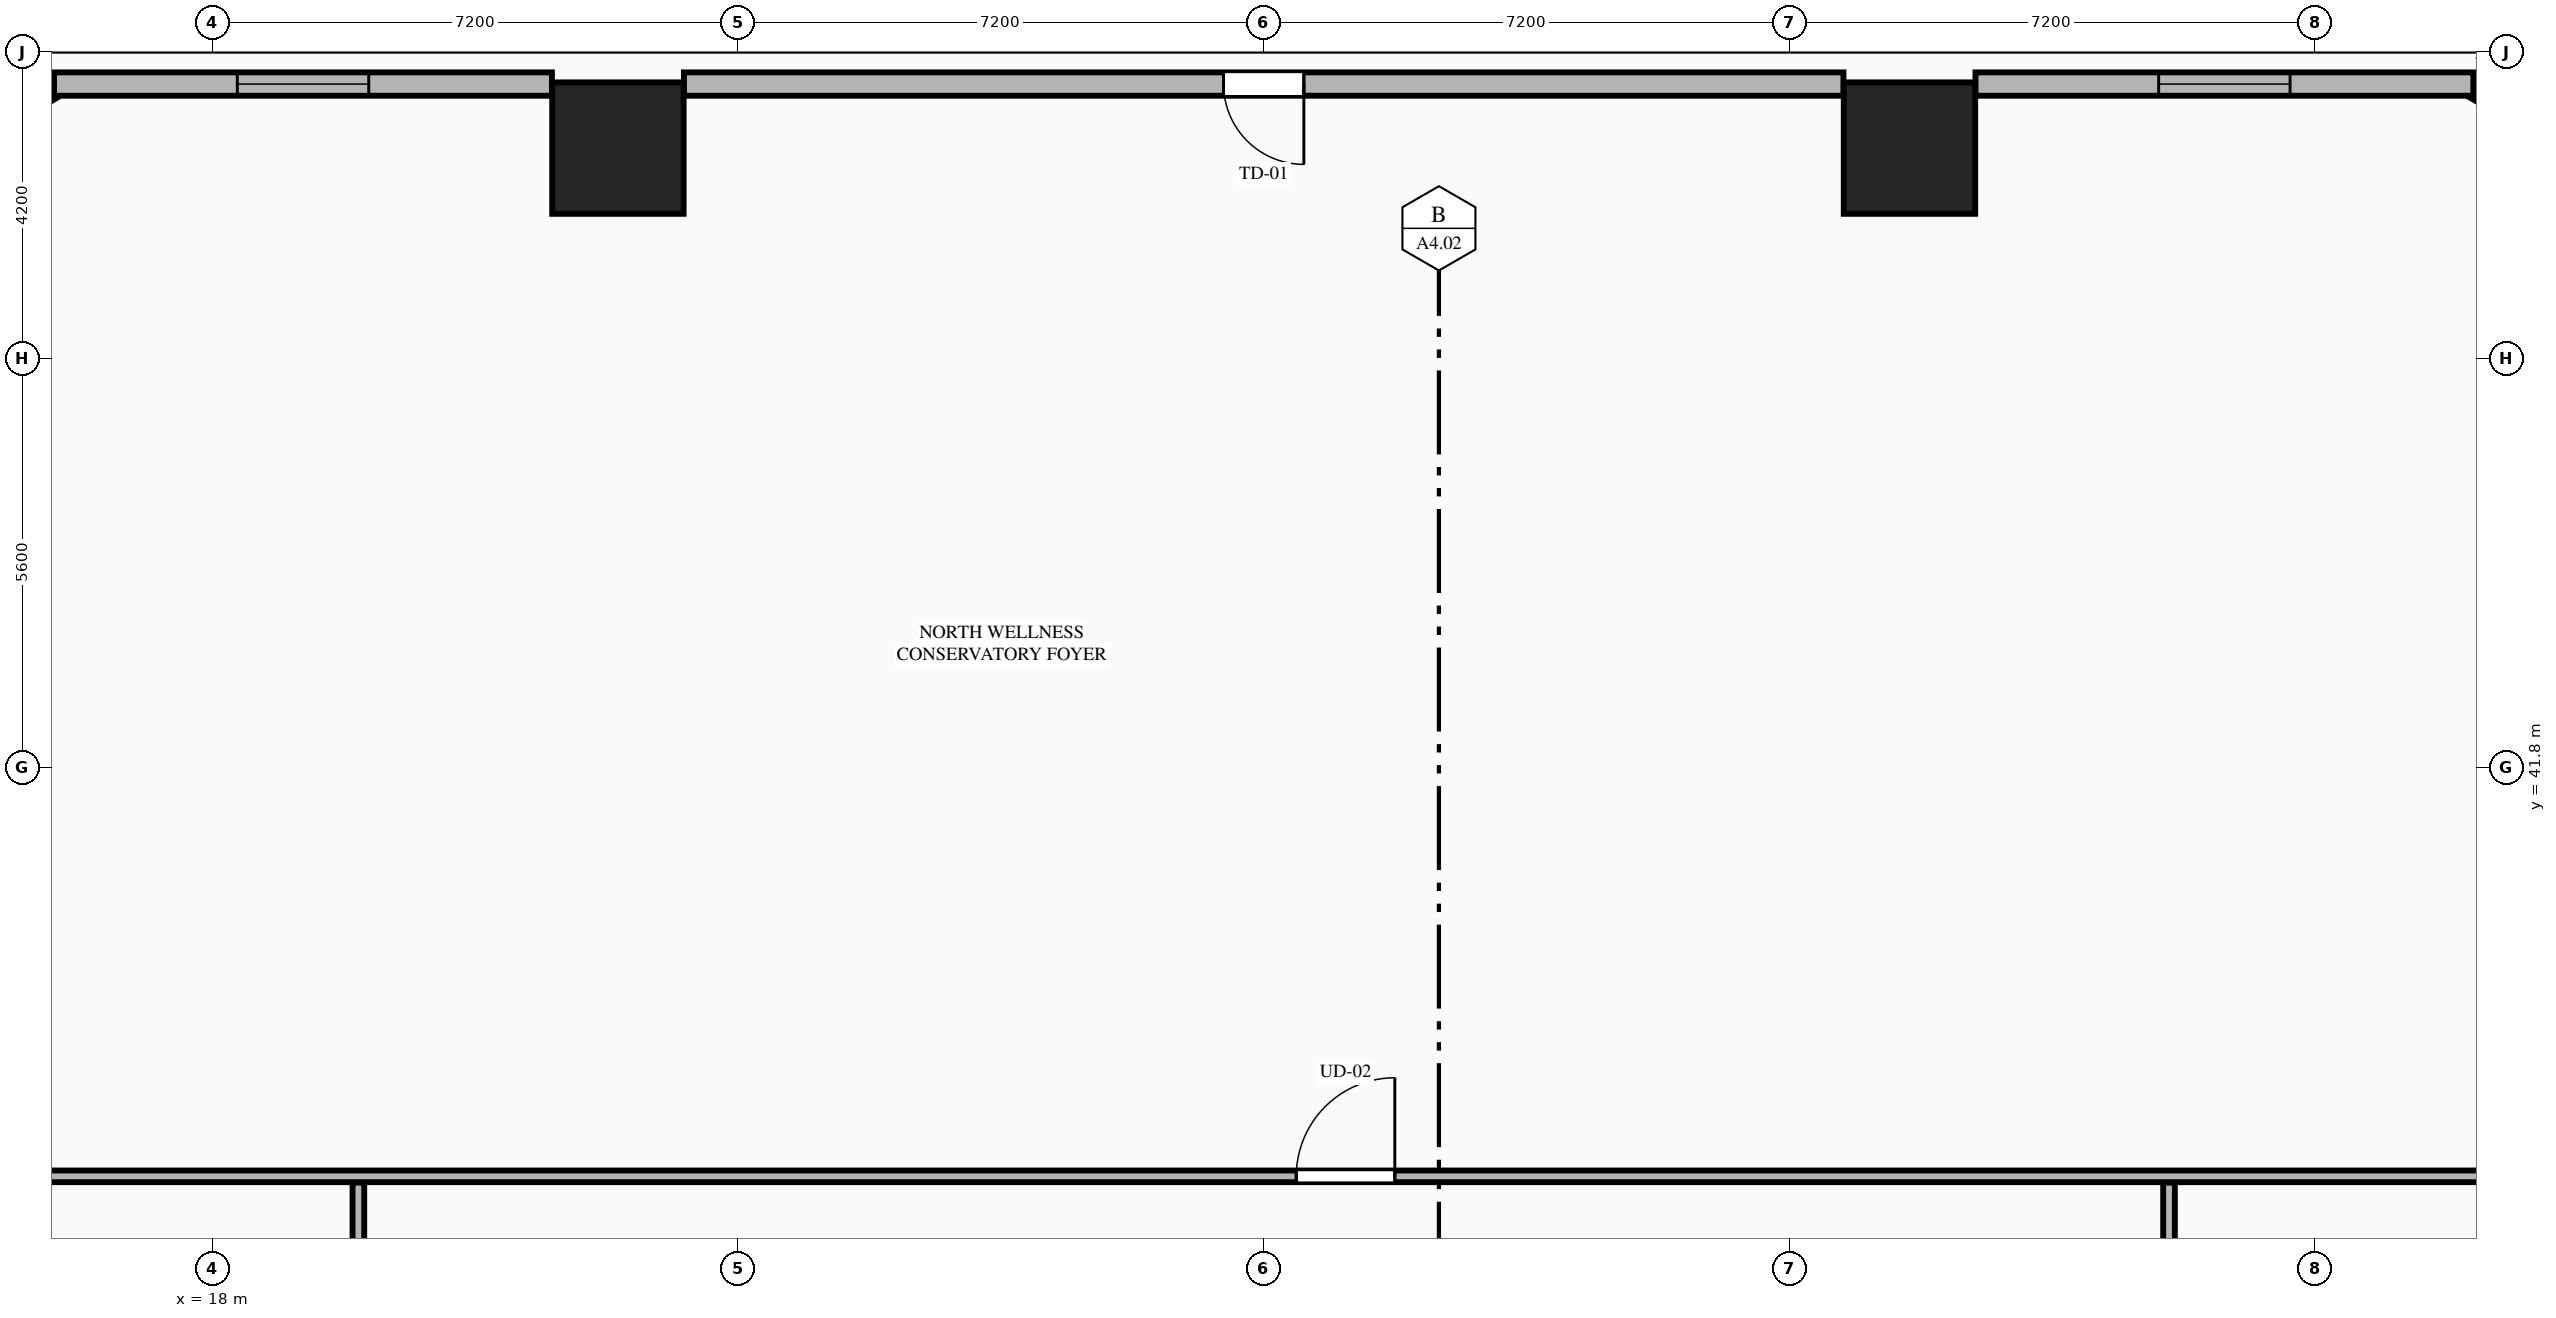
"""IFC4 building model, lengths in metres.
Left out: names, types, materials, properties, quantities, classifications, styles, units other than length and angle.
Written with IfcOpenShell. Run it as: python <this file> out.ifc"""

import sys

from ifc_helpers import new_model, si_unit, direction, frame, frame_2d, origin, origin_2d, place, context, subcontext, project, spatial, rectangle, extrude, element, fill, save


model = new_model("IFC4")
c1 = context("Model", 3, precision=1e-05, world=origin(), true_north=direction((0.0, 1.0)))
c2 = subcontext(c1, "Body", "Model", "MODEL_VIEW")
j1 = project(units=[si_unit("LENGTHUNIT", "METRE"), si_unit("PLANEANGLEUNIT", "RADIAN")], contexts=[c1])
p1 = place(None, origin())
s1 = spatial("IfcSite", under=j1, at=p1, CompositionType="ELEMENT")
p2 = place(p1, origin())
s2 = spatial("IfcBuilding", under=s1, at=p2, CompositionType="ELEMENT")
p3 = place(p2, frame((0.0, 0.0, 15.0)))
s3 = spatial("IfcBuildingStorey", under=s2, at=p3, CompositionType="ELEMENT", Elevation=15.0)
for number, where, z_axis, x_axis in (
    (1, (41.245, 50.283, 0.0), (0.0, 0.0, 1.0), (1.0, 0.0, 0.0)),
    (2, (23.555, 50.283, 0.0), (0.0, 0.0, 1.0), (1.0, 0.0, 0.0)),
):
    element("IfcColumn", number, at=place(p3, frame(where, z_axis=z_axis, x_axis=x_axis)), inside=s3, PredefinedType="COLUMN", context=c2, shape_type="SweptSolid", body=[
        extrude(rectangle(XDim=1.8, YDim=1.8, at=origin_2d()), origin(), (0.0, 0.0, 1.0), 4.5),
    ])
p4 = place(p3, frame((20.0, 17.8, 0.0), z_axis=(0.0, 0.0, 1.0), x_axis=(0.0, 1.0, 0.0)))
e3 = element("IfcWall", 3, at=p4, inside=s3, PredefinedType="PARTITIONING", context=c2, shape_type="SweptSolid", body=[
    extrude(rectangle(XDim=18.315, YDim=0.16, at=frame_2d((9.157, 0.0))), origin(), (0.0, 0.0, 1.0), 4.22),
])
p5 = place(p4, frame((3.8, 0.0, 0.0)))
e4 = element("IfcOpeningElement", 4, at=p5, cuts=e3, PredefinedType="OPENING", context=c2, shape_type="SweptSolid", body=[
    extrude(rectangle(XDim=1.35, YDim=2.35, at=frame_2d((0.675, 1.175))), frame((0.0, 0.09, 0.0), z_axis=(0.0, -1.0, 0.0), x_axis=(1.0, 0.0, 0.0)), (0.0, 0.0, 1.0), 0.18),
])
p6 = place(p4, frame((13.0, 0.0, 0.0)))
e5 = element("IfcOpeningElement", 5, at=p6, cuts=e3, PredefinedType="OPENING", context=c2, shape_type="SweptSolid", body=[
    extrude(rectangle(XDim=1.02, YDim=2.25, at=frame_2d((0.51, 1.125))), frame((0.0, 0.09, 0.0), z_axis=(0.0, -1.0, 0.0), x_axis=(1.0, 0.0, 0.0)), (0.0, 0.0, 1.0), 0.18),
])
p7 = place(p3, frame((44.8, 17.8, 0.0), z_axis=(0.0, 0.0, 1.0), x_axis=(0.0, 1.0, 0.0)))
e6 = element("IfcWall", 6, at=p7, inside=s3, PredefinedType="PARTITIONING", context=c2, shape_type="SweptSolid", body=[
    extrude(rectangle(XDim=18.315, YDim=0.16, at=frame_2d((9.157, 0.0))), origin(), (0.0, 0.0, 1.0), 4.22),
])
p8 = place(p7, frame((3.8, 0.0, 0.0)))
e7 = element("IfcOpeningElement", 7, at=p8, cuts=e6, PredefinedType="OPENING", context=c2, shape_type="SweptSolid", body=[
    extrude(rectangle(XDim=1.35, YDim=2.35, at=frame_2d((0.675, 1.175))), frame((0.0, 0.09, 0.0), z_axis=(0.0, -1.0, 0.0), x_axis=(1.0, 0.0, 0.0)), (0.0, 0.0, 1.0), 0.18),
])
p9 = place(p7, frame((13.8, 0.0, 0.0)))
e8 = element("IfcOpeningElement", 8, at=p9, cuts=e6, PredefinedType="OPENING", context=c2, shape_type="SweptSolid", body=[
    extrude(rectangle(XDim=0.86, YDim=2.1, at=frame_2d((0.43, 1.05))), frame((0.0, 0.09, 0.0), z_axis=(0.0, -1.0, 0.0), x_axis=(1.0, 0.0, 0.0)), (0.0, 0.0, 1.0), 0.18),
])
p10 = place(p7, frame((16.3, 0.0, 0.0)))
e9 = element("IfcOpeningElement", 9, at=p10, cuts=e6, PredefinedType="OPENING", context=c2, shape_type="SweptSolid", body=[
    extrude(rectangle(XDim=0.96, YDim=2.15, at=frame_2d((0.48, 1.075))), frame((0.0, 0.09, 0.0), z_axis=(0.0, -1.0, 0.0), x_axis=(1.0, 0.0, 0.0)), (0.0, 0.0, 1.0), 0.18),
])
p11 = place(p3, frame((6.346, 36.2, 0.0), z_axis=(0.0, 0.0, 1.0), x_axis=(1.0, 0.0, 0.0)))
e10 = element("IfcWall", 10, at=p11, inside=s3, PredefinedType="PARTITIONING", context=c2, shape_type="SweptSolid", body=[
    extrude(rectangle(XDim=52.108, YDim=0.16, at=frame_2d((26.054, 0.0))), origin(), (0.0, 0.0, 1.0), 4.22),
])
p12 = place(p11, frame((6.5, 0.0, 0.0)))
e11 = element("IfcOpeningElement", 11, at=p12, cuts=e10, PredefinedType="OPENING", context=c2, shape_type="SweptSolid", body=[
    extrude(rectangle(XDim=1.35, YDim=2.35, at=frame_2d((0.675, 1.175))), frame((0.0, 0.09, 0.0), z_axis=(0.0, -1.0, 0.0), x_axis=(1.0, 0.0, 0.0)), (0.0, 0.0, 1.0), 0.18),
])
p13 = place(p11, frame((26.5, 0.0, 0.0)))
e12 = element("IfcOpeningElement", 12, at=p13, cuts=e10, PredefinedType="OPENING", context=c2, shape_type="SweptSolid", body=[
    extrude(rectangle(XDim=1.35, YDim=2.35, at=frame_2d((0.675, 1.175))), frame((0.0, 0.09, 0.0), z_axis=(0.0, -1.0, 0.0), x_axis=(1.0, 0.0, 0.0)), (0.0, 0.0, 1.0), 0.18),
])
p14 = place(p3, frame((50.903, 49.992, 0.0), z_axis=(0.0, 0.0, 1.0), x_axis=(-0.861209017918, 0.508250949293, 0.0)))
e13 = element("IfcWall", 13, at=p14, inside=s3, PredefinedType="STANDARD", context=c2, shape_type="SweptSolid", body=[
    extrude(rectangle(XDim=2.253, YDim=0.32, at=frame_2d((1.126, 0.0))), origin(), (0.0, 0.0, 1.0), 4.22),
])
p15 = place(p3, frame((15.837, 51.137, 0.0), z_axis=(0.0, 0.0, 1.0), x_axis=(-0.861181020205, -0.508298387209, 0.0)))
e14 = element("IfcWall", 14, at=p15, inside=s3, PredefinedType="STANDARD", context=c2, shape_type="SweptSolid", body=[
    extrude(rectangle(XDim=2.253, YDim=0.32, at=frame_2d((1.126, 0.0))), origin(), (0.0, 0.0, 1.0), 4.22),
])
p16 = place(p3, frame((48.968, 51.16, 0.0), z_axis=(0.0, 0.0, 1.0), x_axis=(-1.0, 0.0, 0.0)))
e15 = element("IfcWall", 15, at=p16, inside=s3, PredefinedType="STANDARD", context=c2, shape_type="SweptSolid", body=[
    extrude(rectangle(XDim=6.819, YDim=0.32, at=frame_2d((3.41, 0.0))), origin(), (0.0, 0.0, 1.0), 4.22),
])
p17 = place(p16, frame((2.51, 0.0, 0.75)))
e16 = element("IfcOpeningElement", 16, at=p17, cuts=e15, PredefinedType="OPENING", context=c2, shape_type="SweptSolid", body=[
    extrude(rectangle(XDim=1.8, YDim=2.4, at=frame_2d((0.9, 1.2))), frame((0.0, 0.17, 0.0), z_axis=(0.0, -1.0, 0.0), x_axis=(1.0, 0.0, 0.0)), (0.0, 0.0, 1.0), 0.34),
])
p18 = place(p3, frame((40.341, 51.16, 0.0), z_axis=(0.0, 0.0, 1.0), x_axis=(-1.0, 0.0, 0.0)))
e17 = element("IfcWall", 17, at=p18, inside=s3, PredefinedType="STANDARD", context=c2, shape_type="SweptSolid", body=[
    extrude(rectangle(XDim=15.882, YDim=0.32, at=frame_2d((7.941, 0.0))), origin(), (0.0, 0.0, 1.0), 4.22),
])
p19 = place(p18, frame((7.391, 0.0, 0.0)))
e18 = element("IfcOpeningElement", 18, at=p19, cuts=e17, PredefinedType="OPENING", context=c2, shape_type="SweptSolid", body=[
    extrude(rectangle(XDim=1.1, YDim=2.25, at=frame_2d((0.55, 1.125))), frame((0.0, 0.17, 0.0), z_axis=(0.0, -1.0, 0.0), x_axis=(1.0, 0.0, 0.0)), (0.0, 0.0, 1.0), 0.34),
])
p20 = place(p3, frame((22.651, 51.16, 0.0), z_axis=(0.0, 0.0, 1.0), x_axis=(-1.0, 0.0, 0.0)))
e19 = element("IfcWall", 19, at=p20, inside=s3, PredefinedType="STANDARD", context=c2, shape_type="SweptSolid", body=[
    extrude(rectangle(XDim=6.819, YDim=0.32, at=frame_2d((3.409, 0.0))), origin(), (0.0, 0.0, 1.0), 4.22),
])
p21 = place(p20, frame((2.509, 0.0, 0.75)))
e20 = element("IfcOpeningElement", 20, at=p21, cuts=e19, PredefinedType="OPENING", context=c2, shape_type="SweptSolid", body=[
    extrude(rectangle(XDim=1.8, YDim=2.4, at=frame_2d((0.9, 1.2))), frame((0.0, 0.17, 0.0), z_axis=(0.0, -1.0, 0.0), x_axis=(1.0, 0.0, 0.0)), (0.0, 0.0, 1.0), 0.34),
])
p22 = place(p13, origin())
e21 = element("IfcDoor", 21, at=p22, inside=s3, OperationType="SINGLE_SWING_RIGHT", PredefinedType="DOOR", context=c2, shape_type="SweptSolid", body=[
    extrude(rectangle(XDim=1.35, YDim=2.35, at=frame_2d((0.675, 1.175))), frame((0.0, 0.025, 0.0), z_axis=(0.0, -1.0, 0.0), x_axis=(1.0, 0.0, 0.0)), (0.0, 0.0, 1.0), 0.05),
])
fill(e12, e21)
p23 = place(p17, origin())
e22 = element("IfcWindow", 22, at=p23, inside=s3, PartitioningType="SINGLE_PANEL", PredefinedType="WINDOW", context=c2, shape_type="SweptSolid", body=[
    extrude(rectangle(XDim=1.8, YDim=2.4, at=frame_2d((0.9, 1.2))), frame((0.0, 0.03, 0.0), z_axis=(0.0, -1.0, 0.0), x_axis=(1.0, 0.0, 0.0)), (0.0, 0.0, 1.0), 0.06),
])
fill(e16, e22)
p24 = place(p19, origin())
e23 = element("IfcDoor", 23, at=p24, inside=s3, OperationType="SINGLE_SWING_LEFT", PredefinedType="DOOR", context=c2, shape_type="SweptSolid", body=[
    extrude(rectangle(XDim=1.1, YDim=2.25, at=frame_2d((0.55, 1.125))), frame((0.0, 0.025, 0.0), z_axis=(0.0, -1.0, 0.0), x_axis=(1.0, 0.0, 0.0)), (0.0, 0.0, 1.0), 0.05),
])
fill(e18, e23)
p25 = place(p21, origin())
e24 = element("IfcWindow", 24, at=p25, inside=s3, PartitioningType="SINGLE_PANEL", PredefinedType="WINDOW", context=c2, shape_type="SweptSolid", body=[
    extrude(rectangle(XDim=1.8, YDim=2.4, at=frame_2d((0.9, 1.2))), frame((0.0, 0.03, 0.0), z_axis=(0.0, -1.0, 0.0), x_axis=(1.0, 0.0, 0.0)), (0.0, 0.0, 1.0), 0.06),
])
fill(e20, e24)
save(model, sys.argv[1])
